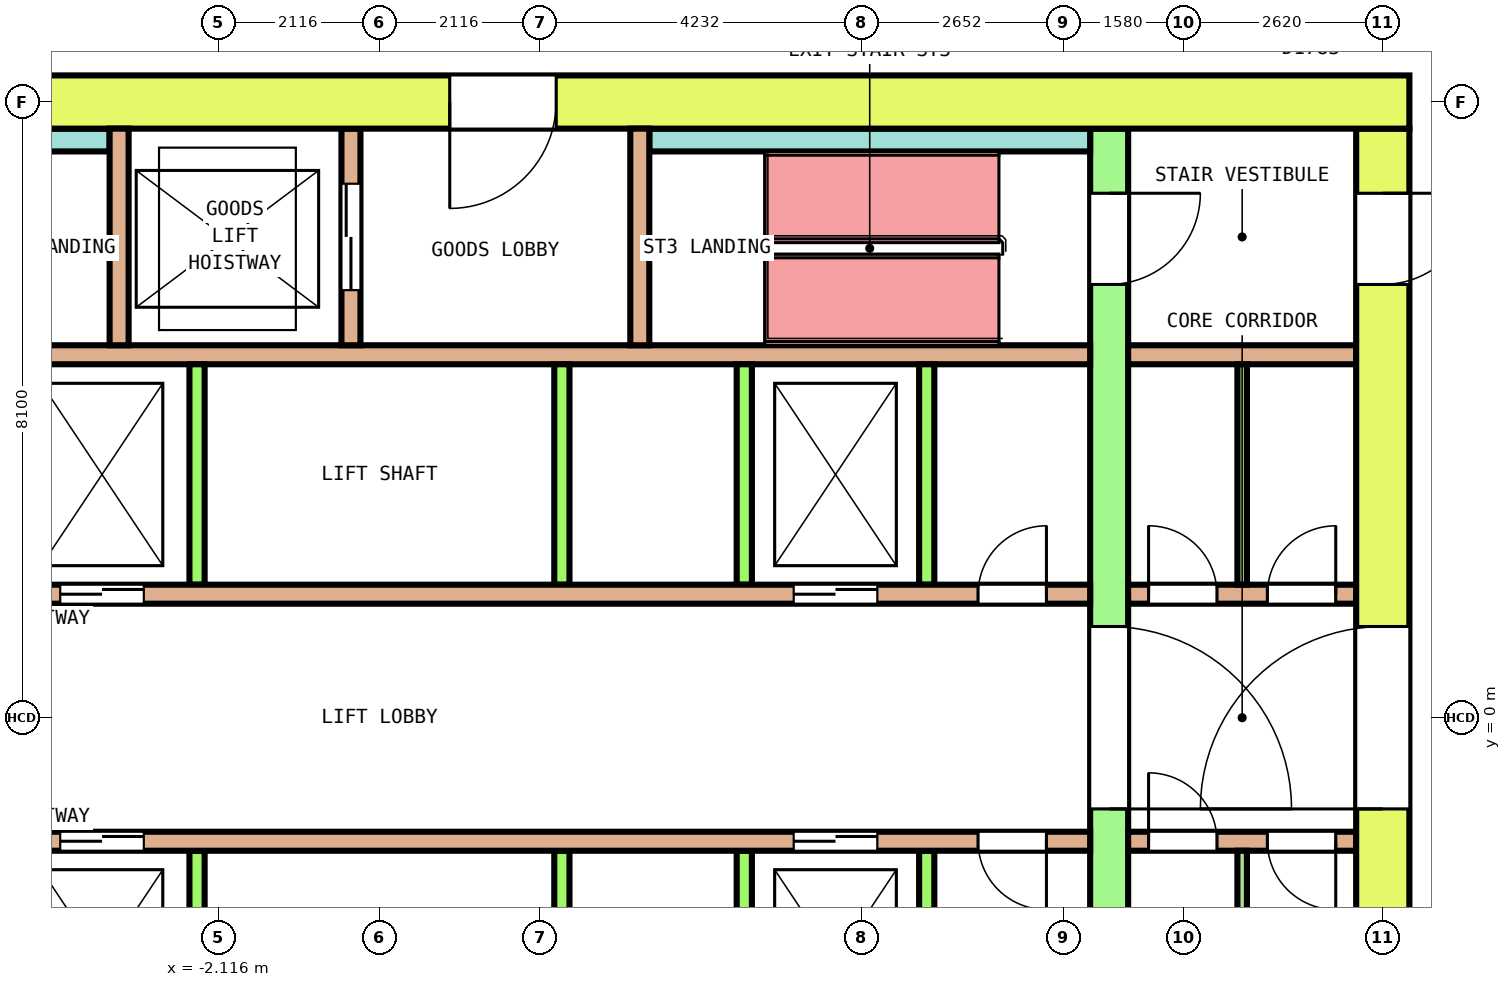
"""IFC4 building model, lengths in metres.
Left out: names, types, materials, properties, quantities, classifications, styles, units other than length and angle.
Written with IfcOpenShell. Run it as: python <this file> out.ifc"""

import sys

from ifc_helpers import new_model, si_unit, direction, frame, frame_2d, origin, place, context, subcontext, project, spatial, rectangle, extrude, element, fill, save


model = new_model("IFC4")
c1 = context("Model", 3, precision=1e-05, world=origin(), true_north=direction((0.0, 1.0)))
c2 = subcontext(c1, "Body", "Model", "MODEL_VIEW")
j1 = project(units=[si_unit("LENGTHUNIT", "METRE"), si_unit("PLANEANGLEUNIT", "RADIAN")], contexts=[c1])
p1 = place(None, origin())
s1 = spatial("IfcSite", under=j1, at=p1, CompositionType="ELEMENT")
p2 = place(p1, origin())
s2 = spatial("IfcBuilding", under=s1, at=p2, CompositionType="ELEMENT")
p3 = place(p2, frame((0.0, 0.0, 167.2)))
s3 = spatial("IfcBuildingStorey", under=s2, at=p3, CompositionType="ELEMENT", Elevation=167.2)
p4 = place(p3, frame((-13.55, 8.1, 0.0), z_axis=(0.0, 0.0, 1.0), x_axis=(1.0, 0.0, 0.0)))
e1 = element("IfcWall", 1, at=p4, inside=s3, PredefinedType="SHEAR", context=c2, shape_type="SweptSolid", body=[
    extrude(rectangle(XDim=27.1, YDim=0.7, at=frame_2d((13.55, 0.0))), origin(), (0.0, 0.0, 1.0), 4.1),
])
p5 = place(p4, frame((14.475, 0.0, 0.0)))
e2 = element("IfcOpeningElement", 2, at=p5, cuts=e1, PredefinedType="OPENING", context=c2, shape_type="SweptSolid", body=[
    extrude(rectangle(XDim=1.4, YDim=2.1, at=frame_2d((0.7, 1.05))), frame((0.0, 0.36, 0.0), z_axis=(0.0, -1.0, 0.0), x_axis=(1.0, 0.0, 0.0)), (0.0, 0.0, 1.0), 0.72),
])
p6 = place(p3, frame((13.2, -7.75, 0.0), z_axis=(0.0, 0.0, 1.0), x_axis=(0.0, 1.0, 0.0)))
e3 = element("IfcWall", 3, at=p6, inside=s3, PredefinedType="SHEAR", context=c2, shape_type="SweptSolid", body=[
    extrude(rectangle(XDim=15.5, YDim=0.7, at=frame_2d((7.75, 0.0))), origin(), (0.0, 0.0, 1.0), 4.1),
])
p7 = place(p6, frame((6.55, 0.0, 0.0)))
e4 = element("IfcOpeningElement", 4, at=p7, cuts=e3, PredefinedType="OPENING", context=c2, shape_type="SweptSolid", body=[
    extrude(rectangle(XDim=2.4, YDim=2.1, at=frame_2d((1.2, 1.05))), frame((0.0, 0.36, 0.0), z_axis=(0.0, -1.0, 0.0), x_axis=(1.0, 0.0, 0.0)), (0.0, 0.0, 1.0), 0.72),
])
p8 = place(p6, frame((13.45, 0.0, 0.0)))
e5 = element("IfcOpeningElement", 5, at=p8, cuts=e3, PredefinedType="OPENING", context=c2, shape_type="SweptSolid", body=[
    extrude(rectangle(XDim=1.2, YDim=2.1, at=frame_2d((0.6, 1.05))), frame((0.0, 0.36, 0.0), z_axis=(0.0, -1.0, 0.0), x_axis=(1.0, 0.0, 0.0)), (0.0, 0.0, 1.0), 0.72),
])
p9 = place(p6, frame((0.95, 0.0, 0.0)))
e6 = element("IfcOpeningElement", 6, at=p9, cuts=e3, PredefinedType="OPENING", context=c2, shape_type="SweptSolid", body=[
    extrude(rectangle(XDim=1.0, YDim=2.1, at=frame_2d((0.5, 1.05))), frame((0.0, 0.36, 0.0), z_axis=(0.0, -1.0, 0.0), x_axis=(1.0, 0.0, 0.0)), (0.0, 0.0, 1.0), 0.72),
])
p10 = place(p3, frame((9.6, -7.75, 0.0), z_axis=(0.0, 0.0, 1.0), x_axis=(0.0, 1.0, 0.0)))
e7 = element("IfcWall", 7, at=p10, inside=s3, PredefinedType="SHEAR", context=c2, shape_type="SweptSolid", body=[
    extrude(rectangle(XDim=15.5, YDim=0.5, at=frame_2d((7.75, 0.0))), origin(), (0.0, 0.0, 1.0), 4.1),
])
p11 = place(p10, frame((6.55, 0.0, 0.0)))
e8 = element("IfcOpeningElement", 8, at=p11, cuts=e7, PredefinedType="OPENING", context=c2, shape_type="SweptSolid", body=[
    extrude(rectangle(XDim=2.4, YDim=2.1, at=frame_2d((1.2, 1.05))), frame((0.0, 0.26, 0.0), z_axis=(0.0, -1.0, 0.0), x_axis=(1.0, 0.0, 0.0)), (0.0, 0.0, 1.0), 0.52),
])
p12 = place(p10, frame((13.45, 0.0, 0.0)))
e9 = element("IfcOpeningElement", 9, at=p12, cuts=e7, PredefinedType="OPENING", context=c2, shape_type="SweptSolid", body=[
    extrude(rectangle(XDim=1.2, YDim=2.1, at=frame_2d((0.6, 1.05))), frame((0.0, 0.26, 0.0), z_axis=(0.0, -1.0, 0.0), x_axis=(1.0, 0.0, 0.0)), (0.0, 0.0, 1.0), 0.52),
])
p13 = place(p10, frame((0.95, 0.0, 0.0)))
e10 = element("IfcOpeningElement", 10, at=p13, cuts=e7, PredefinedType="OPENING", context=c2, shape_type="SweptSolid", body=[
    extrude(rectangle(XDim=1.0, YDim=2.1, at=frame_2d((0.5, 1.05))), frame((0.0, 0.26, 0.0), z_axis=(0.0, -1.0, 0.0), x_axis=(1.0, 0.0, 0.0)), (0.0, 0.0, 1.0), 0.52),
])
p14 = place(p3, frame((-9.35, 1.625, 0.0), z_axis=(0.0, 0.0, 1.0), x_axis=(1.0, 0.0, 0.0)))
e11 = element("IfcWall", 11, at=p14, inside=s3, PredefinedType="SOLIDWALL", context=c2, shape_type="SweptSolid", body=[
    extrude(rectangle(XDim=18.7, YDim=0.25, at=frame_2d((9.35, 0.0))), origin(), (0.0, 0.0, 1.0), 4.1),
])
p15 = place(p14, frame((2.85, 0.0, 0.0)))
e12 = element("IfcOpeningElement", 12, at=p15, cuts=e11, PredefinedType="OPENING", context=c2, shape_type="SweptSolid", body=[
    extrude(rectangle(XDim=1.1, YDim=2.1, at=frame_2d((0.55, 1.05))), frame((0.0, 0.135, 0.0), z_axis=(0.0, -1.0, 0.0), x_axis=(1.0, 0.0, 0.0)), (0.0, 0.0, 1.0), 0.27),
])
p16 = place(p14, frame((5.15, 0.0, 0.0)))
e13 = element("IfcOpeningElement", 13, at=p16, cuts=e11, PredefinedType="OPENING", context=c2, shape_type="SweptSolid", body=[
    extrude(rectangle(XDim=1.1, YDim=2.1, at=frame_2d((0.55, 1.05))), frame((0.0, 0.135, 0.0), z_axis=(0.0, -1.0, 0.0), x_axis=(1.0, 0.0, 0.0)), (0.0, 0.0, 1.0), 0.27),
])
p17 = place(p14, frame((14.8, 0.0, 0.0)))
e14 = element("IfcOpeningElement", 14, at=p17, cuts=e11, PredefinedType="OPENING", context=c2, shape_type="SweptSolid", body=[
    extrude(rectangle(XDim=1.1, YDim=2.1, at=frame_2d((0.55, 1.05))), frame((0.0, 0.135, 0.0), z_axis=(0.0, -1.0, 0.0), x_axis=(1.0, 0.0, 0.0)), (0.0, 0.0, 1.0), 0.27),
])
p18 = place(p14, frame((0.575, 0.0, 0.0)))
e15 = element("IfcOpeningElement", 15, at=p18, cuts=e11, PredefinedType="OPENING", context=c2, shape_type="SweptSolid", body=[
    extrude(rectangle(XDim=0.9, YDim=2.1, at=frame_2d((0.45, 1.05))), frame((0.0, 0.135, 0.0), z_axis=(0.0, -1.0, 0.0), x_axis=(1.0, 0.0, 0.0)), (0.0, 0.0, 1.0), 0.27),
])
p19 = place(p14, frame((17.225, 0.0, 0.0)))
e16 = element("IfcOpeningElement", 16, at=p19, cuts=e11, PredefinedType="OPENING", context=c2, shape_type="SweptSolid", body=[
    extrude(rectangle(XDim=0.9, YDim=2.1, at=frame_2d((0.45, 1.05))), frame((0.0, 0.135, 0.0), z_axis=(0.0, -1.0, 0.0), x_axis=(1.0, 0.0, 0.0)), (0.0, 0.0, 1.0), 0.27),
])
p20 = place(p3, frame((9.85, 1.625, 0.0), z_axis=(0.0, 0.0, 1.0), x_axis=(1.0, 0.0, 0.0)))
e17 = element("IfcWall", 17, at=p20, inside=s3, PredefinedType="SOLIDWALL", context=c2, shape_type="SweptSolid", body=[
    extrude(rectangle(XDim=3.0, YDim=0.25, at=frame_2d((1.5, 0.0))), origin(), (0.0, 0.0, 1.0), 4.1),
])
p21 = place(p20, frame((0.269, 0.0, 0.0)))
e18 = element("IfcOpeningElement", 18, at=p21, cuts=e17, PredefinedType="OPENING", context=c2, shape_type="SweptSolid", body=[
    extrude(rectangle(XDim=0.9, YDim=2.1, at=frame_2d((0.45, 1.05))), frame((0.0, 0.135, 0.0), z_axis=(0.0, -1.0, 0.0), x_axis=(1.0, 0.0, 0.0)), (0.0, 0.0, 1.0), 0.27),
])
p22 = place(p20, frame((1.831, 0.0, 0.0)))
e19 = element("IfcOpeningElement", 19, at=p22, cuts=e17, PredefinedType="OPENING", context=c2, shape_type="SweptSolid", body=[
    extrude(rectangle(XDim=0.9, YDim=2.1, at=frame_2d((0.45, 1.05))), frame((0.0, 0.135, 0.0), z_axis=(0.0, -1.0, 0.0), x_axis=(1.0, 0.0, 0.0)), (0.0, 0.0, 1.0), 0.27),
])
p23 = place(p3, frame((-9.35, 4.775, 0.0), z_axis=(0.0, 0.0, 1.0), x_axis=(1.0, 0.0, 0.0)))
e20 = element("IfcWall", 20, at=p23, inside=s3, PredefinedType="SOLIDWALL", context=c2, shape_type="SweptSolid", body=[
    extrude(rectangle(XDim=18.7, YDim=0.25, at=frame_2d((9.35, 0.0))), origin(), (0.0, 0.0, 1.0), 4.1),
])
p24 = place(p3, frame((9.85, 4.775, 0.0), z_axis=(0.0, 0.0, 1.0), x_axis=(1.0, 0.0, 0.0)))
e21 = element("IfcWall", 21, at=p24, inside=s3, PredefinedType="SOLIDWALL", context=c2, shape_type="SweptSolid", body=[
    extrude(rectangle(XDim=3.0, YDim=0.25, at=frame_2d((1.5, 0.0))), origin(), (0.0, 0.0, 1.0), 4.1),
])
for number, where, z_axis, x_axis in (
    (22, (-2.4, 1.75, 0.0), (0.0, 0.0, 1.0), (0.0, 1.0, 0.0)),
    (23, (2.4, 1.75, 0.0), (0.0, 0.0, 1.0), (0.0, 1.0, 0.0)),
    (24, (4.8, 1.75, 0.0), (0.0, 0.0, 1.0), (0.0, 1.0, 0.0)),
    (25, (7.2, 1.75, 0.0), (0.0, 0.0, 1.0), (0.0, 1.0, 0.0)),
):
    element("IfcWall", number, at=place(p3, frame(where, z_axis=z_axis, x_axis=x_axis)), inside=s3, PredefinedType="SOLIDWALL", context=c2, shape_type="SweptSolid", body=[
        extrude(rectangle(XDim=2.9, YDim=0.2, at=frame_2d((1.45, 0.0))), origin(), (0.0, 0.0, 1.0), 4.1),
    ])
p25 = place(p3, frame((-9.35, -1.625, 0.0), z_axis=(0.0, 0.0, 1.0), x_axis=(1.0, 0.0, 0.0)))
e26 = element("IfcWall", 26, at=p25, inside=s3, PredefinedType="SOLIDWALL", context=c2, shape_type="SweptSolid", body=[
    extrude(rectangle(XDim=18.7, YDim=0.25, at=frame_2d((9.35, 0.0))), origin(), (0.0, 0.0, 1.0), 4.1),
])
p26 = place(p25, frame((2.85, 0.0, 0.0)))
e27 = element("IfcOpeningElement", 27, at=p26, cuts=e26, PredefinedType="OPENING", context=c2, shape_type="SweptSolid", body=[
    extrude(rectangle(XDim=1.1, YDim=2.1, at=frame_2d((0.55, 1.05))), frame((0.0, 0.135, 0.0), z_axis=(0.0, -1.0, 0.0), x_axis=(1.0, 0.0, 0.0)), (0.0, 0.0, 1.0), 0.27),
])
p27 = place(p25, frame((5.15, 0.0, 0.0)))
e28 = element("IfcOpeningElement", 28, at=p27, cuts=e26, PredefinedType="OPENING", context=c2, shape_type="SweptSolid", body=[
    extrude(rectangle(XDim=1.1, YDim=2.1, at=frame_2d((0.55, 1.05))), frame((0.0, 0.135, 0.0), z_axis=(0.0, -1.0, 0.0), x_axis=(1.0, 0.0, 0.0)), (0.0, 0.0, 1.0), 0.27),
])
p28 = place(p25, frame((14.8, 0.0, 0.0)))
e29 = element("IfcOpeningElement", 29, at=p28, cuts=e26, PredefinedType="OPENING", context=c2, shape_type="SweptSolid", body=[
    extrude(rectangle(XDim=1.1, YDim=2.1, at=frame_2d((0.55, 1.05))), frame((0.0, 0.135, 0.0), z_axis=(0.0, -1.0, 0.0), x_axis=(1.0, 0.0, 0.0)), (0.0, 0.0, 1.0), 0.27),
])
p29 = place(p25, frame((0.575, 0.0, 0.0)))
e30 = element("IfcOpeningElement", 30, at=p29, cuts=e26, PredefinedType="OPENING", context=c2, shape_type="SweptSolid", body=[
    extrude(rectangle(XDim=0.9, YDim=2.1, at=frame_2d((0.45, 1.05))), frame((0.0, 0.135, 0.0), z_axis=(0.0, -1.0, 0.0), x_axis=(1.0, 0.0, 0.0)), (0.0, 0.0, 1.0), 0.27),
])
p30 = place(p25, frame((17.225, 0.0, 0.0)))
e31 = element("IfcOpeningElement", 31, at=p30, cuts=e26, PredefinedType="OPENING", context=c2, shape_type="SweptSolid", body=[
    extrude(rectangle(XDim=0.9, YDim=2.1, at=frame_2d((0.45, 1.05))), frame((0.0, 0.135, 0.0), z_axis=(0.0, -1.0, 0.0), x_axis=(1.0, 0.0, 0.0)), (0.0, 0.0, 1.0), 0.27),
])
p31 = place(p3, frame((9.85, -1.625, 0.0), z_axis=(0.0, 0.0, 1.0), x_axis=(1.0, 0.0, 0.0)))
e32 = element("IfcWall", 32, at=p31, inside=s3, PredefinedType="SOLIDWALL", context=c2, shape_type="SweptSolid", body=[
    extrude(rectangle(XDim=3.0, YDim=0.25, at=frame_2d((1.5, 0.0))), origin(), (0.0, 0.0, 1.0), 4.1),
])
p32 = place(p31, frame((0.269, 0.0, 0.0)))
e33 = element("IfcOpeningElement", 33, at=p32, cuts=e32, PredefinedType="OPENING", context=c2, shape_type="SweptSolid", body=[
    extrude(rectangle(XDim=0.9, YDim=2.1, at=frame_2d((0.45, 1.05))), frame((0.0, 0.135, 0.0), z_axis=(0.0, -1.0, 0.0), x_axis=(1.0, 0.0, 0.0)), (0.0, 0.0, 1.0), 0.27),
])
p33 = place(p31, frame((1.831, 0.0, 0.0)))
e34 = element("IfcOpeningElement", 34, at=p33, cuts=e32, PredefinedType="OPENING", context=c2, shape_type="SweptSolid", body=[
    extrude(rectangle(XDim=0.9, YDim=2.1, at=frame_2d((0.45, 1.05))), frame((0.0, 0.135, 0.0), z_axis=(0.0, -1.0, 0.0), x_axis=(1.0, 0.0, 0.0)), (0.0, 0.0, 1.0), 0.27),
])
for number, where, z_axis, x_axis in (
    (35, (-2.4, -4.65, 0.0), (0.0, 0.0, 1.0), (0.0, 1.0, 0.0)),
    (36, (2.4, -4.65, 0.0), (0.0, 0.0, 1.0), (0.0, 1.0, 0.0)),
    (37, (4.8, -4.65, 0.0), (0.0, 0.0, 1.0), (0.0, 1.0, 0.0)),
    (38, (7.2, -4.65, 0.0), (0.0, 0.0, 1.0), (0.0, 1.0, 0.0)),
):
    element("IfcWall", number, at=place(p3, frame(where, z_axis=z_axis, x_axis=x_axis)), inside=s3, PredefinedType="SOLIDWALL", context=c2, shape_type="SweptSolid", body=[
        extrude(rectangle(XDim=2.9, YDim=0.2, at=frame_2d((1.45, 0.0))), origin(), (0.0, 0.0, 1.0), 4.1),
    ])
for number, where, z_axis, x_axis in (
    (39, (-9.35, 7.6, 0.0), (0.0, 0.0, 1.0), (1.0, 0.0, 0.0)),
    (40, (3.55, 7.6, 0.0), (0.0, 0.0, 1.0), (1.0, 0.0, 0.0)),
):
    element("IfcWall", number, at=place(p3, frame(where, z_axis=z_axis, x_axis=x_axis)), inside=s3, PredefinedType="SOLIDWALL", context=c2, shape_type="SweptSolid", body=[
        extrude(rectangle(XDim=5.8, YDim=0.3, at=frame_2d((2.9, 0.0))), origin(), (0.0, 0.0, 1.0), 4.1),
    ])
p34 = place(p3, frame((-3.425, 4.9, 0.0), z_axis=(0.0, 0.0, 1.0), x_axis=(0.0, 1.0, 0.0)))
e41 = element("IfcWall", 41, at=p34, inside=s3, PredefinedType="SOLIDWALL", context=c2, shape_type="SweptSolid", body=[
    extrude(rectangle(XDim=2.85, YDim=0.25, at=frame_2d((1.425, 0.0))), origin(), (0.0, 0.0, 1.0), 4.1),
])
p35 = place(p3, frame((-0.375, 4.9, 0.0), z_axis=(0.0, 0.0, 1.0), x_axis=(0.0, 1.0, 0.0)))
e42 = element("IfcWall", 42, at=p35, inside=s3, PredefinedType="SOLIDWALL", context=c2, shape_type="SweptSolid", body=[
    extrude(rectangle(XDim=2.85, YDim=0.25, at=frame_2d((1.425, 0.0))), origin(), (0.0, 0.0, 1.0), 4.1),
])
p36 = place(p35, frame((0.725, 0.0, 0.0)))
e43 = element("IfcOpeningElement", 43, at=p36, cuts=e42, PredefinedType="OPENING", context=c2, shape_type="SweptSolid", body=[
    extrude(rectangle(XDim=1.4, YDim=2.1, at=frame_2d((0.7, 1.05))), frame((0.0, 0.135, 0.0), z_axis=(0.0, -1.0, 0.0), x_axis=(1.0, 0.0, 0.0)), (0.0, 0.0, 1.0), 0.27),
])
p37 = place(p3, frame((3.425, 4.9, 0.0), z_axis=(0.0, 0.0, 1.0), x_axis=(0.0, 1.0, 0.0)))
e44 = element("IfcWall", 44, at=p37, inside=s3, PredefinedType="SOLIDWALL", context=c2, shape_type="SweptSolid", body=[
    extrude(rectangle(XDim=2.85, YDim=0.25, at=frame_2d((1.425, 0.0))), origin(), (0.0, 0.0, 1.0), 4.1),
])
for number, where, z_axis, x_axis in (
    (45, (11.35, 1.75, 0.0), (0.0, 0.0, 1.0), (0.0, 1.0, 0.0)),
    (46, (11.35, -4.65, 0.0), (0.0, 0.0, 1.0), (0.0, 1.0, 0.0)),
):
    element("IfcWall", number, at=place(p3, frame(where, z_axis=z_axis, x_axis=x_axis)), inside=s3, PredefinedType="PARTITIONING", context=c2, shape_type="SweptSolid", body=[
        extrude(rectangle(XDim=2.9, YDim=0.125, at=frame_2d((1.45, 0.0))), origin(), (0.0, 0.0, 1.0), 4.1),
    ])
p38 = place(p16, origin())
e47 = element("IfcDoor", 47, at=p38, inside=s3, OperationType="DOUBLE_DOOR_SLIDING", PredefinedType="DOOR", context=c2, shape_type="SweptSolid", body=[
    extrude(rectangle(XDim=1.1, YDim=2.1, at=frame_2d((0.55, 1.05))), frame((0.0, 0.075, 0.0), z_axis=(0.0, -1.0, 0.0), x_axis=(1.0, 0.0, 0.0)), (0.0, 0.0, 1.0), 0.15),
])
fill(e13, e47)
p39 = place(p17, origin())
e48 = element("IfcDoor", 48, at=p39, inside=s3, OperationType="DOUBLE_DOOR_SLIDING", PredefinedType="DOOR", context=c2, shape_type="SweptSolid", body=[
    extrude(rectangle(XDim=1.1, YDim=2.1, at=frame_2d((0.55, 1.05))), frame((0.0, 0.075, 0.0), z_axis=(0.0, -1.0, 0.0), x_axis=(1.0, 0.0, 0.0)), (0.0, 0.0, 1.0), 0.15),
])
fill(e14, e48)
p40 = place(p27, origin())
e49 = element("IfcDoor", 49, at=p40, inside=s3, OperationType="DOUBLE_DOOR_SLIDING", PredefinedType="DOOR", context=c2, shape_type="SweptSolid", body=[
    extrude(rectangle(XDim=1.1, YDim=2.1, at=frame_2d((0.55, 1.05))), frame((0.0, 0.075, 0.0), z_axis=(0.0, -1.0, 0.0), x_axis=(1.0, 0.0, 0.0)), (0.0, 0.0, 1.0), 0.15),
])
fill(e28, e49)
p41 = place(p28, origin())
e50 = element("IfcDoor", 50, at=p41, inside=s3, OperationType="DOUBLE_DOOR_SLIDING", PredefinedType="DOOR", context=c2, shape_type="SweptSolid", body=[
    extrude(rectangle(XDim=1.1, YDim=2.1, at=frame_2d((0.55, 1.05))), frame((0.0, 0.075, 0.0), z_axis=(0.0, -1.0, 0.0), x_axis=(1.0, 0.0, 0.0)), (0.0, 0.0, 1.0), 0.15),
])
fill(e29, e50)
p42 = place(p36, origin())
e51 = element("IfcDoor", 51, at=p42, inside=s3, OperationType="DOUBLE_DOOR_SLIDING", PredefinedType="DOOR", context=c2, shape_type="SweptSolid", body=[
    extrude(rectangle(XDim=1.4, YDim=2.1, at=frame_2d((0.7, 1.05))), frame((0.0, 0.075, 0.0), z_axis=(0.0, -1.0, 0.0), x_axis=(1.0, 0.0, 0.0)), (0.0, 0.0, 1.0), 0.15),
])
fill(e43, e51)
p43 = place(p11, origin())
e52 = element("IfcDoor", 52, at=p43, inside=s3, OperationType="DOUBLE_DOOR_SINGLE_SWING", PredefinedType="DOOR", context=c2, shape_type="SweptSolid", body=[
    extrude(rectangle(XDim=2.4, YDim=2.1, at=frame_2d((1.2, 1.05))), frame((0.0, 0.2, 0.0), z_axis=(0.0, -1.0, 0.0), x_axis=(1.0, 0.0, 0.0)), (0.0, 0.0, 1.0), 0.4),
])
fill(e8, e52)
p44 = place(p7, origin())
e53 = element("IfcDoor", 53, at=p44, inside=s3, OperationType="DOUBLE_DOOR_SINGLE_SWING", PredefinedType="DOOR", context=c2, shape_type="SweptSolid", body=[
    extrude(rectangle(XDim=2.4, YDim=2.1, at=frame_2d((1.2, 1.05))), frame((0.0, 0.3, 0.0), z_axis=(0.0, -1.0, 0.0), x_axis=(1.0, 0.0, 0.0)), (0.0, 0.0, 1.0), 0.6),
])
fill(e4, e53)
p45 = place(p12, origin())
e54 = element("IfcDoor", 54, at=p45, inside=s3, OperationType="SINGLE_SWING_LEFT", PredefinedType="DOOR", context=c2, shape_type="SweptSolid", body=[
    extrude(rectangle(XDim=1.2, YDim=2.1, at=frame_2d((0.6, 1.05))), frame((0.0, 0.2, 0.0), z_axis=(0.0, -1.0, 0.0), x_axis=(1.0, 0.0, 0.0)), (0.0, 0.0, 1.0), 0.4),
])
fill(e9, e54)
p46 = place(p8, origin())
e55 = element("IfcDoor", 55, at=p46, inside=s3, OperationType="SINGLE_SWING_RIGHT", PredefinedType="DOOR", context=c2, shape_type="SweptSolid", body=[
    extrude(rectangle(XDim=1.2, YDim=2.1, at=frame_2d((0.6, 1.05))), frame((0.0, 0.3, 0.0), z_axis=(0.0, -1.0, 0.0), x_axis=(1.0, 0.0, 0.0)), (0.0, 0.0, 1.0), 0.6),
])
fill(e5, e55)
p47 = place(p5, origin())
e56 = element("IfcDoor", 56, at=p47, inside=s3, OperationType="DOUBLE_DOOR_SINGLE_SWING", PredefinedType="DOOR", context=c2, shape_type="SweptSolid", body=[
    extrude(rectangle(XDim=1.4, YDim=2.1, at=frame_2d((0.7, 1.05))), frame((0.0, 0.3, 0.0), z_axis=(0.0, -1.0, 0.0), x_axis=(1.0, 0.0, 0.0)), (0.0, 0.0, 1.0), 0.6),
])
fill(e2, e56)
p48 = place(p19, origin())
e57 = element("IfcDoor", 57, at=p48, inside=s3, OperationType="SINGLE_SWING_RIGHT", PredefinedType="DOOR", context=c2, shape_type="SweptSolid", body=[
    extrude(rectangle(XDim=0.9, YDim=2.1, at=frame_2d((0.45, 1.05))), frame((0.0, 0.075, 0.0), z_axis=(0.0, -1.0, 0.0), x_axis=(1.0, 0.0, 0.0)), (0.0, 0.0, 1.0), 0.15),
])
fill(e16, e57)
p49 = place(p21, origin())
e58 = element("IfcDoor", 58, at=p49, inside=s3, OperationType="SINGLE_SWING_LEFT", PredefinedType="DOOR", context=c2, shape_type="SweptSolid", body=[
    extrude(rectangle(XDim=0.9, YDim=2.1, at=frame_2d((0.45, 1.05))), frame((0.0, 0.075, 0.0), z_axis=(0.0, -1.0, 0.0), x_axis=(1.0, 0.0, 0.0)), (0.0, 0.0, 1.0), 0.15),
])
fill(e18, e58)
p50 = place(p22, origin())
e59 = element("IfcDoor", 59, at=p50, inside=s3, OperationType="SINGLE_SWING_RIGHT", PredefinedType="DOOR", context=c2, shape_type="SweptSolid", body=[
    extrude(rectangle(XDim=0.9, YDim=2.1, at=frame_2d((0.45, 1.05))), frame((0.0, 0.075, 0.0), z_axis=(0.0, -1.0, 0.0), x_axis=(1.0, 0.0, 0.0)), (0.0, 0.0, 1.0), 0.15),
])
fill(e19, e59)
p51 = place(p30, origin())
e60 = element("IfcDoor", 60, at=p51, inside=s3, OperationType="SINGLE_SWING_RIGHT", PredefinedType="DOOR", context=c2, shape_type="SweptSolid", body=[
    extrude(rectangle(XDim=0.9, YDim=2.1, at=frame_2d((0.45, 1.05))), frame((0.0, 0.075, 0.0), z_axis=(0.0, -1.0, 0.0), x_axis=(1.0, 0.0, 0.0)), (0.0, 0.0, 1.0), 0.15),
])
fill(e31, e60)
p52 = place(p32, origin())
e61 = element("IfcDoor", 61, at=p52, inside=s3, OperationType="SINGLE_SWING_LEFT", PredefinedType="DOOR", context=c2, shape_type="SweptSolid", body=[
    extrude(rectangle(XDim=0.9, YDim=2.1, at=frame_2d((0.45, 1.05))), frame((0.0, 0.075, 0.0), z_axis=(0.0, -1.0, 0.0), x_axis=(1.0, 0.0, 0.0)), (0.0, 0.0, 1.0), 0.15),
])
fill(e33, e61)
p53 = place(p33, origin())
e62 = element("IfcDoor", 62, at=p53, inside=s3, OperationType="SINGLE_SWING_RIGHT", PredefinedType="DOOR", context=c2, shape_type="SweptSolid", body=[
    extrude(rectangle(XDim=0.9, YDim=2.1, at=frame_2d((0.45, 1.05))), frame((0.0, 0.075, 0.0), z_axis=(0.0, -1.0, 0.0), x_axis=(1.0, 0.0, 0.0)), (0.0, 0.0, 1.0), 0.15),
])
fill(e34, e62)
save(model, sys.argv[1])
